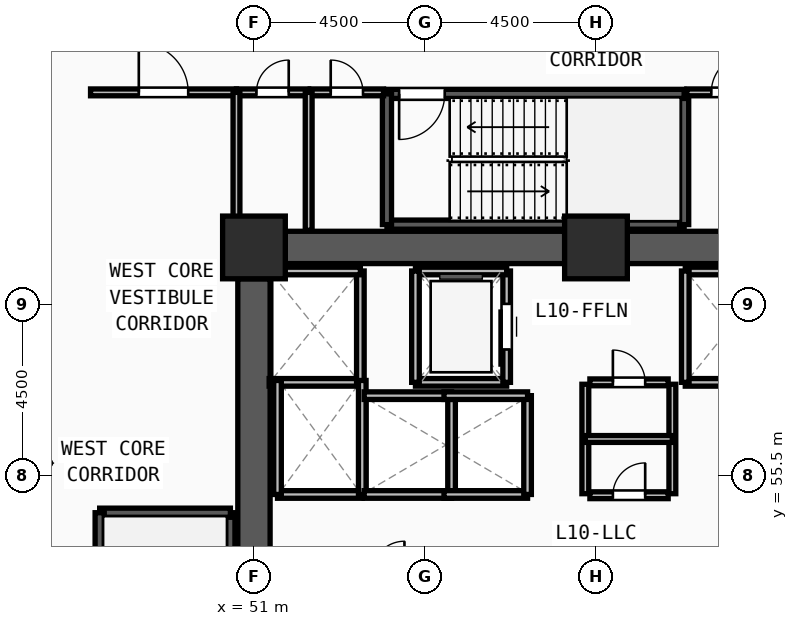
"""IFC4 building model, lengths in metres.
Left out: names, types, materials, properties, quantities, classifications, styles, units other than length and angle.
Written with IfcOpenShell. Run it as: python <this file> out.ifc"""

import sys

from ifc_helpers import new_model, si_unit, direction, frame, frame_2d, origin, origin_2d, place, context, subcontext, project, spatial, rectangle, extrude, source, transform, mapped, element, fill, save


model = new_model("IFC4")
c1 = context("Model", 3, precision=1e-05, world=origin(), true_north=direction((0.0, 1.0)))
c2 = subcontext(c1, "Body", "Model", "MODEL_VIEW")
j1 = project(units=[si_unit("LENGTHUNIT", "METRE"), si_unit("PLANEANGLEUNIT", "RADIAN")], contexts=[c1])
p1 = place(None, origin())
s1 = spatial("IfcSite", under=j1, at=p1, CompositionType="ELEMENT")
p2 = place(p1, origin())
s2 = spatial("IfcBuilding", under=s1, at=p2, CompositionType="ELEMENT")
p3 = place(p2, frame((0.0, 0.0, 39.75)))
s3 = spatial("IfcBuildingStorey", under=s2, at=p3, CompositionType="ELEMENT", Elevation=39.75)
m1 = source(origin(), c2, "Body", "SweptSolid", [
    extrude(rectangle(XDim=1.65, YDim=1.65, at=origin_2d()), origin(), (0.0, 0.0, 1.0), 3.75),
])
for number, where, z_axis, x_axis in (
    (1, (60.0, 61.5, 0.0), (0.0, 0.0, 1.0), (1.0, 0.0, 0.0)),
    (2, (51.0, 61.5, 0.0), (0.0, 0.0, 1.0), (1.0, 0.0, 0.0)),
):
    element("IfcColumn", number, at=place(p3, frame(where, z_axis=z_axis, x_axis=x_axis)), inside=s3, PredefinedType="COLUMN", context=c2, shape_type="MappedRepresentation", body=[
        mapped(m1, transform((0.0, 0.0, 0.0), x_axis=(1.0, 0.0, 0.0), y_axis=(0.0, 1.0, 0.0), z_axis=(0.0, 0.0, 1.0), scale=1.0)),
    ])
for number, where, z_axis, x_axis in (
    (3, (51.825, 61.5, 0.0), (0.0, 0.0, 1.0), (1.0, 0.0, 0.0)),
    (4, (60.825, 61.5, 0.0), (0.0, 0.0, 1.0), (1.0, 0.0, 0.0)),
):
    element("IfcWall", number, at=place(p3, frame(where, z_axis=z_axis, x_axis=x_axis)), inside=s3, PredefinedType="SHEAR", context=c2, shape_type="SweptSolid", body=[
        extrude(rectangle(XDim=7.35, YDim=0.85, at=frame_2d((3.675, 0.0))), origin(), (0.0, 0.0, 1.0), 3.57),
    ])
p4 = place(p3, frame((51.0, 47.325, 0.0), z_axis=(0.0, 0.0, 1.0), x_axis=(0.0, 1.0, 0.0)))
e5 = element("IfcWall", 5, at=p4, inside=s3, PredefinedType="SHEAR", context=c2, shape_type="SweptSolid", body=[
    extrude(rectangle(XDim=13.35, YDim=0.85, at=frame_2d((6.675, 0.0))), origin(), (0.0, 0.0, 1.0), 3.57),
])
p5 = place(p3, frame((50.38, 46.7, 0.0), z_axis=(0.0, 0.0, 1.0), x_axis=(0.0, 1.0, 0.0)))
e6 = element("IfcWall", 6, at=p5, inside=s3, PredefinedType="SOLIDWALL", context=c2, shape_type="SweptSolid", body=[
    extrude(rectangle(XDim=7.82, YDim=0.24, at=frame_2d((3.91, 0.0))), origin(), (0.0, 0.0, 1.0), 3.57),
])
p6 = place(p3, frame((50.38, 54.52, 0.0), z_axis=(0.0, 0.0, 1.0), x_axis=(-1.0, 0.0, 0.0)))
e7 = element("IfcWall", 7, at=p6, inside=s3, PredefinedType="SOLIDWALL", context=c2, shape_type="SweptSolid", body=[
    extrude(rectangle(XDim=3.44, YDim=0.24, at=frame_2d((1.72, 0.0))), origin(), (0.0, 0.0, 1.0), 3.57),
])
p7 = place(p3, frame((46.94, 54.52, 0.0), z_axis=(0.0, 0.0, 1.0), x_axis=(0.0, -1.0, 0.0)))
e8 = element("IfcWall", 8, at=p7, inside=s3, PredefinedType="SOLIDWALL", context=c2, shape_type="SweptSolid", body=[
    extrude(rectangle(XDim=7.82, YDim=0.24, at=frame_2d((3.91, 0.0))), origin(), (0.0, 0.0, 1.0), 3.57),
])
m2 = source(origin(), c2, "Body", "SweptSolid", [
    extrude(rectangle(XDim=1.2, YDim=2.2, at=frame_2d((0.6, 1.1))), frame((0.0, 0.13, 0.0), z_axis=(0.0, -1.0, 0.0), x_axis=(1.0, 0.0, 0.0)), (0.0, 0.0, 1.0), 0.26),
])
p8 = place(p7, frame((6.3, 0.0, 0.0)))
e9 = element("IfcOpeningElement", 9, at=p8, cuts=e8, PredefinedType="OPENING", context=c2, shape_type="MappedRepresentation", body=[
    mapped(m2, transform((0.0, 0.0, 0.0), x_axis=(1.0, 0.0, 0.0), y_axis=(0.0, 1.0, 0.0), z_axis=(0.0, 0.0, 1.0), scale=1.0)),
])
p9 = place(p3, frame((54.5, 62.1, 0.0), z_axis=(0.0, 0.0, 1.0), x_axis=(1.0, 0.0, 0.0)))
e10 = element("IfcWall", 10, at=p9, inside=s3, PredefinedType="SOLIDWALL", context=c2, shape_type="SweptSolid", body=[
    extrude(rectangle(XDim=7.82, YDim=0.24, at=frame_2d((3.91, 0.0))), origin(), (0.0, 0.0, 1.0), 3.57),
])
p10 = place(p3, frame((62.32, 62.1, 0.0), z_axis=(0.0, 0.0, 1.0), x_axis=(0.0, 1.0, 0.0)))
e11 = element("IfcWall", 11, at=p10, inside=s3, PredefinedType="SOLIDWALL", context=c2, shape_type="SweptSolid", body=[
    extrude(rectangle(XDim=3.44, YDim=0.24, at=frame_2d((1.72, 0.0))), origin(), (0.0, 0.0, 1.0), 3.57),
])
p11 = place(p3, frame((62.32, 65.54, 0.0), z_axis=(0.0, 0.0, 1.0), x_axis=(-1.0, 0.0, 0.0)))
e12 = element("IfcWall", 12, at=p11, inside=s3, PredefinedType="SOLIDWALL", context=c2, shape_type="SweptSolid", body=[
    extrude(rectangle(XDim=7.82, YDim=0.24, at=frame_2d((3.91, 0.0))), origin(), (0.0, 0.0, 1.0), 3.57),
])
p12 = place(p11, frame((6.3, 0.0, 0.0)))
e13 = element("IfcOpeningElement", 13, at=p12, cuts=e12, PredefinedType="OPENING", context=c2, shape_type="MappedRepresentation", body=[
    mapped(m2, transform((0.0, 0.0, 0.0), x_axis=(1.0, 0.0, 0.0), y_axis=(0.0, 1.0, 0.0), z_axis=(0.0, 0.0, 1.0), scale=1.0)),
])
p13 = place(p3, frame((54.5, 65.54, 0.0), z_axis=(0.0, 0.0, 1.0), x_axis=(0.0, -1.0, 0.0)))
e14 = element("IfcWall", 14, at=p13, inside=s3, PredefinedType="SOLIDWALL", context=c2, shape_type="SweptSolid", body=[
    extrude(rectangle(XDim=3.44, YDim=0.24, at=frame_2d((1.72, 0.0))), origin(), (0.0, 0.0, 1.0), 3.57),
])
p14 = place(p3, frame((55.25, 57.95, 0.0), z_axis=(0.0, 0.0, 1.0), x_axis=(1.0, 0.0, 0.0)))
e15 = element("IfcWall", 15, at=p14, inside=s3, PredefinedType="SOLIDWALL", context=c2, shape_type="SweptSolid", body=[
    extrude(rectangle(XDim=2.4, YDim=0.2, at=frame_2d((1.2, 0.0))), origin(), (0.0, 0.0, 1.0), 3.57),
])
p15 = place(p3, frame((57.65, 57.95, 0.0), z_axis=(0.0, 0.0, 1.0), x_axis=(0.0, 1.0, 0.0)))
e16 = element("IfcWall", 16, at=p15, inside=s3, PredefinedType="SOLIDWALL", context=c2, shape_type="SweptSolid", body=[
    extrude(rectangle(XDim=2.93, YDim=0.2, at=frame_2d((1.465, 0.0))), origin(), (0.0, 0.0, 1.0), 3.57),
])
m3 = source(origin(), c2, "Body", "SweptSolid", [
    extrude(rectangle(XDim=1.2, YDim=2.3, at=frame_2d((0.6, 1.15))), frame((0.0, 0.11, 0.0), z_axis=(0.0, -1.0, 0.0), x_axis=(1.0, 0.0, 0.0)), (0.0, 0.0, 1.0), 0.22),
])
p16 = place(p15, frame((0.865, 0.0, 0.0)))
e17 = element("IfcOpeningElement", 17, at=p16, cuts=e16, PredefinedType="OPENING", context=c2, shape_type="MappedRepresentation", body=[
    mapped(m3, transform((0.0, 0.0, 0.0), x_axis=(1.0, 0.0, 0.0), y_axis=(0.0, 1.0, 0.0), z_axis=(0.0, 0.0, 1.0), scale=1.0)),
])
p17 = place(p3, frame((57.65, 60.88, 0.0), z_axis=(0.0, 0.0, 1.0), x_axis=(-1.0, 0.0, 0.0)))
e18 = element("IfcWall", 18, at=p17, inside=s3, PredefinedType="SOLIDWALL", context=c2, shape_type="SweptSolid", body=[
    extrude(rectangle(XDim=2.4, YDim=0.2, at=frame_2d((1.2, 0.0))), origin(), (0.0, 0.0, 1.0), 3.57),
])
p18 = place(p3, frame((55.25, 60.88, 0.0), z_axis=(0.0, 0.0, 1.0), x_axis=(0.0, -1.0, 0.0)))
e19 = element("IfcWall", 19, at=p18, inside=s3, PredefinedType="SOLIDWALL", context=c2, shape_type="SweptSolid", body=[
    extrude(rectangle(XDim=2.93, YDim=0.2, at=frame_2d((1.465, 0.0))), origin(), (0.0, 0.0, 1.0), 3.57),
])
for number, where, z_axis, x_axis in (
    (20, (62.35, 57.95, 0.0), (0.0, 0.0, 1.0), (1.0, 0.0, 0.0)),
    (21, (64.75, 60.88, 0.0), (0.0, 0.0, 1.0), (-1.0, 0.0, 0.0)),
):
    element("IfcWall", number, at=place(p3, frame(where, z_axis=z_axis, x_axis=x_axis)), inside=s3, PredefinedType="SOLIDWALL", context=c2, shape_type="SweptSolid", body=[
        extrude(rectangle(XDim=2.4, YDim=0.2, at=frame_2d((1.2, 0.0))), origin(), (0.0, 0.0, 1.0), 3.57),
    ])
p19 = place(p3, frame((62.35, 60.88, 0.0), z_axis=(0.0, 0.0, 1.0), x_axis=(0.0, -1.0, 0.0)))
e22 = element("IfcWall", 22, at=p19, inside=s3, PredefinedType="SOLIDWALL", context=c2, shape_type="SweptSolid", body=[
    extrude(rectangle(XDim=2.93, YDim=0.2, at=frame_2d((1.465, 0.0))), origin(), (0.0, 0.0, 1.0), 3.57),
])
p20 = place(p3, frame((51.4, 57.95, 0.0), z_axis=(0.0, 0.0, 1.0), x_axis=(1.0, 0.0, 0.0)))
e23 = element("IfcWall", 23, at=p20, inside=s3, PredefinedType="SOLIDWALL", context=c2, shape_type="SweptSolid", body=[
    extrude(rectangle(XDim=2.4, YDim=0.2, at=frame_2d((1.2, 0.0))), origin(), (0.0, 0.0, 1.0), 3.57),
])
p21 = place(p3, frame((53.8, 57.95, 0.0), z_axis=(0.0, 0.0, 1.0), x_axis=(0.0, 1.0, 0.0)))
e24 = element("IfcWall", 24, at=p21, inside=s3, PredefinedType="SOLIDWALL", context=c2, shape_type="SweptSolid", body=[
    extrude(rectangle(XDim=2.93, YDim=0.2, at=frame_2d((1.465, 0.0))), origin(), (0.0, 0.0, 1.0), 3.57),
])
p22 = place(p3, frame((53.8, 60.88, 0.0), z_axis=(0.0, 0.0, 1.0), x_axis=(-1.0, 0.0, 0.0)))
e25 = element("IfcWall", 25, at=p22, inside=s3, PredefinedType="SOLIDWALL", context=c2, shape_type="SweptSolid", body=[
    extrude(rectangle(XDim=2.4, YDim=0.2, at=frame_2d((1.2, 0.0))), origin(), (0.0, 0.0, 1.0), 3.57),
])
p23 = place(p3, frame((51.62, 55.0, 0.0), z_axis=(0.0, 0.0, 1.0), x_axis=(1.0, 0.0, 0.0)))
e26 = element("IfcWall", 26, at=p23, inside=s3, PredefinedType="SOLIDWALL", context=c2, shape_type="SweptSolid", body=[
    extrude(rectangle(XDim=2.23, YDim=0.2, at=frame_2d((1.115, 0.0))), origin(), (0.0, 0.0, 1.0), 3.57),
])
for number, where, z_axis, x_axis in (
    (27, (53.85, 55.0, 0.0), (0.0, 0.0, 1.0), (0.0, 1.0, 0.0)),
    (28, (51.62, 58.0, 0.0), (0.0, 0.0, 1.0), (0.0, -1.0, 0.0)),
):
    element("IfcWall", number, at=place(p3, frame(where, z_axis=z_axis, x_axis=x_axis)), inside=s3, PredefinedType="SOLIDWALL", context=c2, shape_type="SweptSolid", body=[
        extrude(rectangle(XDim=3.0, YDim=0.2, at=frame_2d((1.5, 0.0))), origin(), (0.0, 0.0, 1.0), 3.57),
    ])
p24 = place(p3, frame((53.9, 55.0, 0.0), z_axis=(0.0, 0.0, 1.0), x_axis=(1.0, 0.0, 0.0)))
e29 = element("IfcWall", 29, at=p24, inside=s3, PredefinedType="SOLIDWALL", context=c2, shape_type="SweptSolid", body=[
    extrude(rectangle(XDim=2.3, YDim=0.2, at=frame_2d((1.15, 0.0))), origin(), (0.0, 0.0, 1.0), 3.57),
])
p25 = place(p3, frame((56.2, 55.0, 0.0), z_axis=(0.0, 0.0, 1.0), x_axis=(0.0, 1.0, 0.0)))
e30 = element("IfcWall", 30, at=p25, inside=s3, PredefinedType="SOLIDWALL", context=c2, shape_type="SweptSolid", body=[
    extrude(rectangle(XDim=2.6, YDim=0.2, at=frame_2d((1.3, 0.0))), origin(), (0.0, 0.0, 1.0), 3.57),
])
p26 = place(p3, frame((56.2, 57.6, 0.0), z_axis=(0.0, 0.0, 1.0), x_axis=(-1.0, 0.0, 0.0)))
e31 = element("IfcWall", 31, at=p26, inside=s3, PredefinedType="SOLIDWALL", context=c2, shape_type="SweptSolid", body=[
    extrude(rectangle(XDim=2.3, YDim=0.2, at=frame_2d((1.15, 0.0))), origin(), (0.0, 0.0, 1.0), 3.57),
])
p27 = place(p3, frame((56.0, 55.0, 0.0), z_axis=(0.0, 0.0, 1.0), x_axis=(1.0, 0.0, 0.0)))
e32 = element("IfcWall", 32, at=p27, inside=s3, PredefinedType="SOLIDWALL", context=c2, shape_type="SweptSolid", body=[
    extrude(rectangle(XDim=2.2, YDim=0.2, at=frame_2d((1.1, 0.0))), origin(), (0.0, 0.0, 1.0), 3.57),
])
p28 = place(p3, frame((58.2, 55.0, 0.0), z_axis=(0.0, 0.0, 1.0), x_axis=(0.0, 1.0, 0.0)))
e33 = element("IfcWall", 33, at=p28, inside=s3, PredefinedType="SOLIDWALL", context=c2, shape_type="SweptSolid", body=[
    extrude(rectangle(XDim=2.6, YDim=0.2, at=frame_2d((1.3, 0.0))), origin(), (0.0, 0.0, 1.0), 3.57),
])
p29 = place(p3, frame((58.2, 57.6, 0.0), z_axis=(0.0, 0.0, 1.0), x_axis=(-1.0, 0.0, 0.0)))
e34 = element("IfcWall", 34, at=p29, inside=s3, PredefinedType="SOLIDWALL", context=c2, shape_type="SweptSolid", body=[
    extrude(rectangle(XDim=2.2, YDim=0.2, at=frame_2d((1.1, 0.0))), origin(), (0.0, 0.0, 1.0), 3.57),
])
p30 = place(p3, frame((59.84, 54.98, 0.0), z_axis=(0.0, 0.0, 1.0), x_axis=(1.0, 0.0, 0.0)))
e35 = element("IfcWall", 35, at=p30, inside=s3, PredefinedType="PARTITIONING", context=c2, shape_type="SweptSolid", body=[
    extrude(rectangle(XDim=2.06, YDim=0.18, at=frame_2d((1.03, 0.0))), origin(), (0.0, 0.0, 1.0), 3.57),
])
m4 = source(origin(), c2, "Body", "SweptSolid", [
    extrude(rectangle(XDim=0.85, YDim=2.1, at=frame_2d((0.425, 1.05))), frame((0.0, 0.1, 0.0), z_axis=(0.0, -1.0, 0.0), x_axis=(1.0, 0.0, 0.0)), (0.0, 0.0, 1.0), 0.2),
])
p31 = place(p30, frame((0.605, 0.0, 0.0)))
e36 = element("IfcOpeningElement", 36, at=p31, cuts=e35, PredefinedType="OPENING", context=c2, shape_type="MappedRepresentation", body=[
    mapped(m4, transform((0.0, 0.0, 0.0), x_axis=(1.0, 0.0, 0.0), y_axis=(0.0, 1.0, 0.0), z_axis=(0.0, 0.0, 1.0), scale=1.0)),
])
p32 = place(p3, frame((59.84, 57.95, 0.0), z_axis=(0.0, 0.0, 1.0), x_axis=(1.0, 0.0, 0.0)))
e37 = element("IfcWall", 37, at=p32, inside=s3, PredefinedType="PARTITIONING", context=c2, shape_type="SweptSolid", body=[
    extrude(rectangle(XDim=2.06, YDim=0.18, at=frame_2d((1.03, 0.0))), origin(), (0.0, 0.0, 1.0), 3.57),
])
p33 = place(p32, frame((0.605, 0.0, 0.0)))
e38 = element("IfcOpeningElement", 38, at=p33, cuts=e37, PredefinedType="OPENING", context=c2, shape_type="MappedRepresentation", body=[
    mapped(m4, transform((0.0, 0.0, 0.0), x_axis=(1.0, 0.0, 0.0), y_axis=(0.0, 1.0, 0.0), z_axis=(0.0, 0.0, 1.0), scale=1.0)),
])
p34 = place(p3, frame((50.54, 65.58, 0.0), z_axis=(0.0, 0.0, 1.0), x_axis=(1.0, 0.0, 0.0)))
e39 = element("IfcWall", 39, at=p34, inside=s3, PredefinedType="PARTITIONING", context=c2, shape_type="SweptSolid", body=[
    extrude(rectangle(XDim=1.9, YDim=0.18, at=frame_2d((0.95, 0.0))), origin(), (0.0, 0.0, 1.0), 3.57),
])
p35 = place(p34, frame((0.525, 0.0, 0.0)))
e40 = element("IfcOpeningElement", 40, at=p35, cuts=e39, PredefinedType="OPENING", context=c2, shape_type="MappedRepresentation", body=[
    mapped(m4, transform((0.0, 0.0, 0.0), x_axis=(1.0, 0.0, 0.0), y_axis=(0.0, 1.0, 0.0), z_axis=(0.0, 0.0, 1.0), scale=1.0)),
])
p36 = place(p3, frame((52.48, 65.58, 0.0), z_axis=(0.0, 0.0, 1.0), x_axis=(1.0, 0.0, 0.0)))
e41 = element("IfcWall", 41, at=p36, inside=s3, PredefinedType="PARTITIONING", context=c2, shape_type="SweptSolid", body=[
    extrude(rectangle(XDim=1.93, YDim=0.18, at=frame_2d((0.965, 0.0))), origin(), (0.0, 0.0, 1.0), 3.57),
])
p37 = place(p36, frame((0.54, 0.0, 0.0)))
e42 = element("IfcOpeningElement", 42, at=p37, cuts=e41, PredefinedType="OPENING", context=c2, shape_type="MappedRepresentation", body=[
    mapped(m4, transform((0.0, 0.0, 0.0), x_axis=(1.0, 0.0, 0.0), y_axis=(0.0, 1.0, 0.0), z_axis=(0.0, 0.0, 1.0), scale=1.0)),
])
p38 = place(p3, frame((62.39, 65.58, 0.0), z_axis=(0.0, 0.0, 1.0), x_axis=(1.0, 0.0, 0.0)))
e43 = element("IfcWall", 43, at=p38, inside=s3, PredefinedType="PARTITIONING", context=c2, shape_type="SweptSolid", body=[
    extrude(rectangle(XDim=2.29, YDim=0.18, at=frame_2d((1.145, 0.0))), origin(), (0.0, 0.0, 1.0), 3.57),
])
m5 = source(origin(), c2, "Body", "SweptSolid", [
    extrude(rectangle(XDim=1.0, YDim=2.2, at=frame_2d((0.5, 1.1))), frame((0.0, 0.1, 0.0), z_axis=(0.0, -1.0, 0.0), x_axis=(1.0, 0.0, 0.0)), (0.0, 0.0, 1.0), 0.2),
])
p39 = place(p38, frame((0.645, 0.0, 0.0)))
e44 = element("IfcOpeningElement", 44, at=p39, cuts=e43, PredefinedType="OPENING", context=c2, shape_type="MappedRepresentation", body=[
    mapped(m5, transform((0.0, 0.0, 0.0), x_axis=(1.0, 0.0, 0.0), y_axis=(0.0, 1.0, 0.0), z_axis=(0.0, 0.0, 1.0), scale=1.0)),
])
p40 = place(p3, frame((46.7, 65.58, 0.0), z_axis=(0.0, 0.0, 1.0), x_axis=(1.0, 0.0, 0.0)))
e45 = element("IfcWall", 45, at=p40, inside=s3, PredefinedType="PARTITIONING", context=c2, shape_type="SweptSolid", body=[
    extrude(rectangle(XDim=3.84, YDim=0.18, at=frame_2d((1.92, 0.0))), origin(), (0.0, 0.0, 1.0), 3.57),
])
m6 = source(origin(), c2, "Body", "SweptSolid", [
    extrude(rectangle(XDim=1.3, YDim=2.2, at=frame_2d((0.65, 1.1))), frame((0.0, 0.1, 0.0), z_axis=(0.0, -1.0, 0.0), x_axis=(1.0, 0.0, 0.0)), (0.0, 0.0, 1.0), 0.2),
])
p41 = place(p40, frame((1.27, 0.0, 0.0)))
e46 = element("IfcOpeningElement", 46, at=p41, cuts=e45, PredefinedType="OPENING", context=c2, shape_type="MappedRepresentation", body=[
    mapped(m6, transform((0.0, 0.0, 0.0), x_axis=(1.0, 0.0, 0.0), y_axis=(0.0, 1.0, 0.0), z_axis=(0.0, 0.0, 1.0), scale=1.0)),
])
for number, where, z_axis, x_axis in (
    (47, (59.72, 55.02, 0.0), (0.0, 0.0, 1.0), (0.0, 1.0, 0.0)),
    (48, (62.01, 55.02, 0.0), (0.0, 0.0, 1.0), (0.0, 1.0, 0.0)),
):
    element("IfcWall", number, at=place(p3, frame(where, z_axis=z_axis, x_axis=x_axis)), inside=s3, PredefinedType="PARTITIONING", context=c2, shape_type="SweptSolid", body=[
        extrude(rectangle(XDim=2.88, YDim=0.18, at=frame_2d((1.44, 0.0))), origin(), (0.0, 0.0, 1.0), 3.57),
    ])
p42 = place(p3, frame((59.72, 56.46, 0.0), z_axis=(0.0, 0.0, 1.0), x_axis=(1.0, 0.0, 0.0)))
e49 = element("IfcWall", 49, at=p42, inside=s3, PredefinedType="PARTITIONING", context=c2, shape_type="SweptSolid", body=[
    extrude(rectangle(XDim=2.29, YDim=0.18, at=frame_2d((1.145, 0.0))), origin(), (0.0, 0.0, 1.0), 3.57),
])
for number, where, z_axis, x_axis in (
    (50, (50.54, 61.95, 0.0), (0.0, 0.0, 1.0), (0.0, 1.0, 0.0)),
    (51, (52.44, 61.95, 0.0), (0.0, 0.0, 1.0), (0.0, 1.0, 0.0)),
):
    element("IfcWall", number, at=place(p3, frame(where, z_axis=z_axis, x_axis=x_axis)), inside=s3, PredefinedType="PARTITIONING", context=c2, shape_type="SweptSolid", body=[
        extrude(rectangle(XDim=3.63, YDim=0.18, at=frame_2d((1.815, 0.0))), origin(), (0.0, 0.0, 1.0), 3.57),
    ])
m7 = source(origin(), c2, "Body", "SweptSolid", [
    extrude(rectangle(XDim=1.2, YDim=2.2, at=frame_2d((0.6, 1.1))), frame((0.0, 0.025, 0.0), z_axis=(0.0, -1.0, 0.0), x_axis=(1.0, 0.0, 0.0)), (0.0, 0.0, 1.0), 0.05),
])
p43 = place(p12, origin())
e52 = element("IfcDoor", 52, at=p43, inside=s3, OperationType="SINGLE_SWING_RIGHT", PredefinedType="DOOR", context=c2, shape_type="MappedRepresentation", body=[
    mapped(m7, transform((0.0, 0.0, 0.0), x_axis=(1.0, 0.0, 0.0), y_axis=(0.0, 1.0, 0.0), z_axis=(0.0, 0.0, 1.0), scale=1.0)),
])
fill(e13, e52)
m8 = source(origin(), c2, "Body", "SweptSolid", [
    extrude(rectangle(XDim=1.2, YDim=2.3, at=frame_2d((0.6, 1.15))), frame((0.0, 0.025, 0.0), z_axis=(0.0, -1.0, 0.0), x_axis=(1.0, 0.0, 0.0)), (0.0, 0.0, 1.0), 0.05),
])
p44 = place(p16, origin())
e53 = element("IfcDoor", 53, at=p44, inside=s3, OperationType="SLIDING_TO_LEFT", PredefinedType="DOOR", context=c2, shape_type="MappedRepresentation", body=[
    mapped(m8, transform((0.0, 0.0, 0.0), x_axis=(1.0, 0.0, 0.0), y_axis=(0.0, 1.0, 0.0), z_axis=(0.0, 0.0, 1.0), scale=1.0)),
])
fill(e17, e53)
m9 = source(origin(), c2, "Body", "SweptSolid", [
    extrude(rectangle(XDim=0.85, YDim=2.1, at=frame_2d((0.425, 1.05))), frame((0.0, 0.025, 0.0), z_axis=(0.0, -1.0, 0.0), x_axis=(1.0, 0.0, 0.0)), (0.0, 0.0, 1.0), 0.05),
])
p45 = place(p31, origin())
e54 = element("IfcDoor", 54, at=p45, inside=s3, OperationType="SINGLE_SWING_RIGHT", PredefinedType="DOOR", context=c2, shape_type="MappedRepresentation", body=[
    mapped(m9, transform((0.0, 0.0, 0.0), x_axis=(1.0, 0.0, 0.0), y_axis=(0.0, 1.0, 0.0), z_axis=(0.0, 0.0, 1.0), scale=1.0)),
])
fill(e36, e54)
p46 = place(p33, origin())
e55 = element("IfcDoor", 55, at=p46, inside=s3, OperationType="SINGLE_SWING_LEFT", PredefinedType="DOOR", context=c2, shape_type="MappedRepresentation", body=[
    mapped(m9, transform((0.0, 0.0, 0.0), x_axis=(1.0, 0.0, 0.0), y_axis=(0.0, 1.0, 0.0), z_axis=(0.0, 0.0, 1.0), scale=1.0)),
])
fill(e38, e55)
p47 = place(p35, origin())
e56 = element("IfcDoor", 56, at=p47, inside=s3, OperationType="SINGLE_SWING_RIGHT", PredefinedType="DOOR", context=c2, shape_type="MappedRepresentation", body=[
    mapped(m9, transform((0.0, 0.0, 0.0), x_axis=(1.0, 0.0, 0.0), y_axis=(0.0, 1.0, 0.0), z_axis=(0.0, 0.0, 1.0), scale=1.0)),
])
fill(e40, e56)
p48 = place(p37, origin())
e57 = element("IfcDoor", 57, at=p48, inside=s3, OperationType="SINGLE_SWING_LEFT", PredefinedType="DOOR", context=c2, shape_type="MappedRepresentation", body=[
    mapped(m9, transform((0.0, 0.0, 0.0), x_axis=(1.0, 0.0, 0.0), y_axis=(0.0, 1.0, 0.0), z_axis=(0.0, 0.0, 1.0), scale=1.0)),
])
fill(e42, e57)
m10 = source(origin(), c2, "Body", "SweptSolid", [
    extrude(rectangle(XDim=1.0, YDim=2.2, at=frame_2d((0.5, 1.1))), frame((0.0, 0.025, 0.0), z_axis=(0.0, -1.0, 0.0), x_axis=(1.0, 0.0, 0.0)), (0.0, 0.0, 1.0), 0.05),
])
p49 = place(p39, origin())
e58 = element("IfcDoor", 58, at=p49, inside=s3, OperationType="SINGLE_SWING_RIGHT", PredefinedType="DOOR", context=c2, shape_type="MappedRepresentation", body=[
    mapped(m10, transform((0.0, 0.0, 0.0), x_axis=(1.0, 0.0, 0.0), y_axis=(0.0, 1.0, 0.0), z_axis=(0.0, 0.0, 1.0), scale=1.0)),
])
fill(e44, e58)
m11 = source(origin(), c2, "Body", "SweptSolid", [
    extrude(rectangle(XDim=1.3, YDim=2.2, at=frame_2d((0.65, 1.1))), frame((0.0, 0.025, 0.0), z_axis=(0.0, -1.0, 0.0), x_axis=(1.0, 0.0, 0.0)), (0.0, 0.0, 1.0), 0.05),
])
p50 = place(p41, origin())
e59 = element("IfcDoor", 59, at=p50, inside=s3, OperationType="SINGLE_SWING_LEFT", PredefinedType="DOOR", context=c2, shape_type="MappedRepresentation", body=[
    mapped(m11, transform((0.0, 0.0, 0.0), x_axis=(1.0, 0.0, 0.0), y_axis=(0.0, 1.0, 0.0), z_axis=(0.0, 0.0, 1.0), scale=1.0)),
])
fill(e46, e59)
save(model, sys.argv[1])
